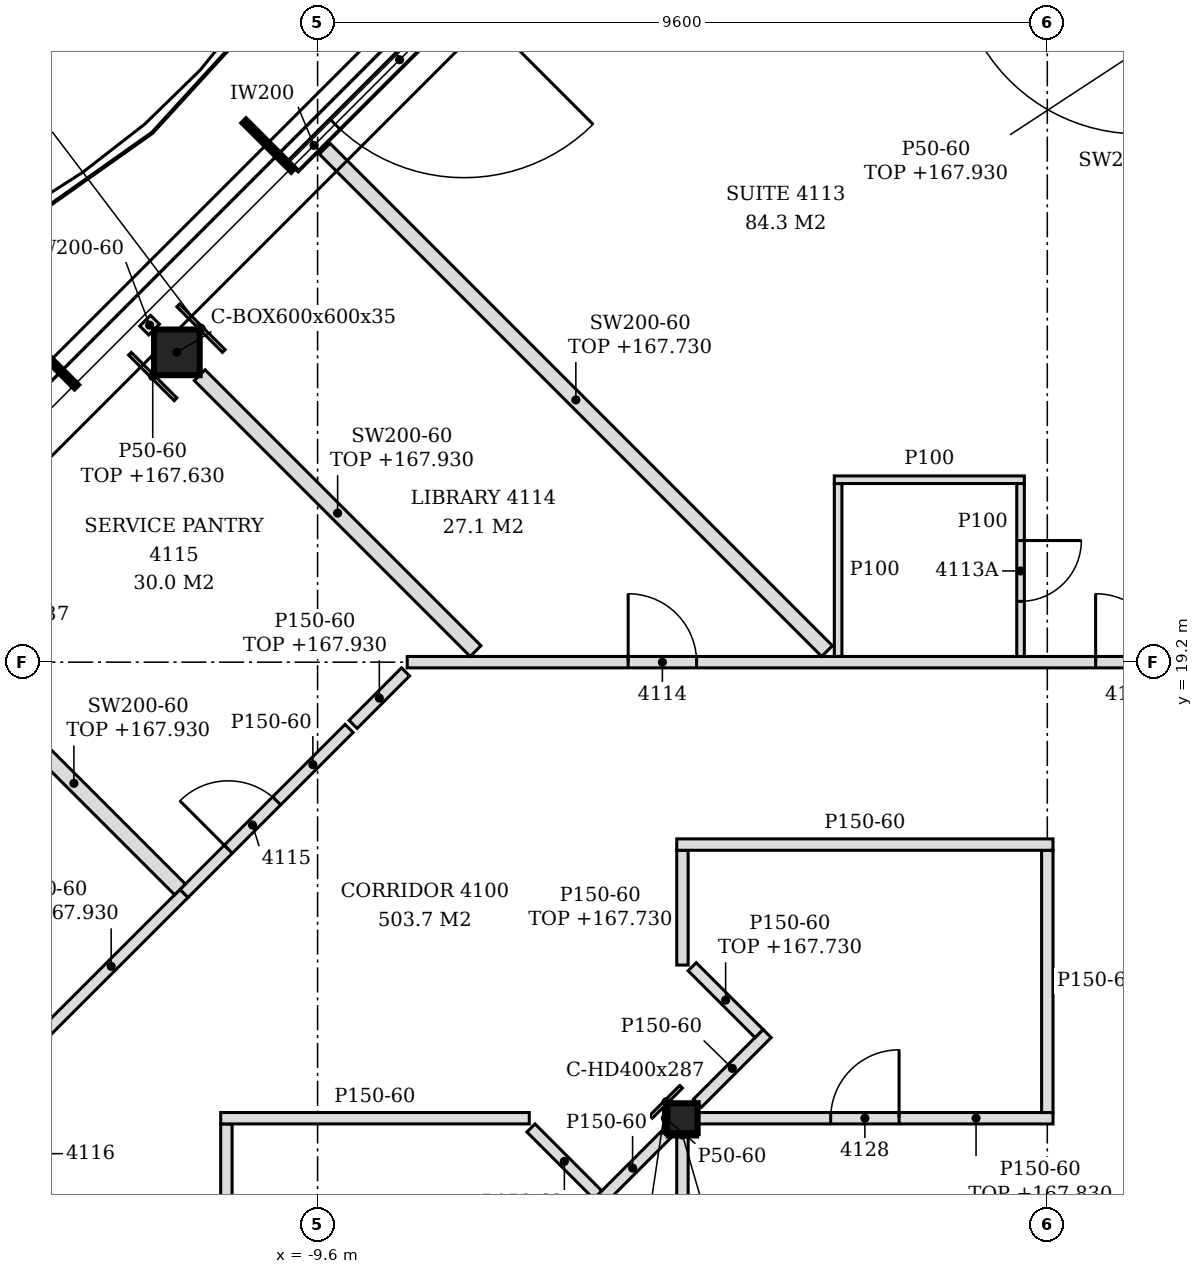
"""IFC4 building model, lengths in metres.
Left out: names, types, materials, properties, quantities, classifications, styles, units other than length and angle.
Written with IfcOpenShell. Run it as: python <this file> out.ifc"""

import sys

from ifc_helpers import new_model, si_unit, direction, frame, frame_2d, origin, origin_2d, place, context, subcontext, project, spatial, polyline, rectangle, hollow_rectangle, i_section, outline, extrude, element, fill, save


model = new_model("IFC4")
c1 = context("Model", 3, precision=1e-05, world=origin(), true_north=direction((0.0, 1.0)))
c2 = subcontext(c1, "Body", "Model", "MODEL_VIEW")
j1 = project(units=[si_unit("LENGTHUNIT", "METRE"), si_unit("PLANEANGLEUNIT", "RADIAN")], contexts=[c1])
p1 = place(None, origin())
s1 = spatial("IfcSite", under=j1, at=p1, CompositionType="ELEMENT")
p2 = place(p1, origin())
s2 = spatial("IfcBuilding", under=s1, at=p2, CompositionType="ELEMENT")
p3 = place(p2, frame((0.0, 0.0, 165.0)))
s3 = spatial("IfcBuildingStorey", under=s2, at=p3, CompositionType="ELEMENT", Elevation=165.0)
p4 = place(p3, frame((-11.451, 23.276, -0.15), z_axis=(0.0, 0.0, 1.0), x_axis=(1.0, 0.0, 0.0)))
e1 = element("IfcColumn", 1, at=p4, inside=s3, PredefinedType="COLUMN", context=c2, shape_type="SweptSolid", body=[
    extrude(hollow_rectangle(XDim=0.6, YDim=0.6, WallThickness=0.035, at=origin_2d()), origin(), (0.0, 0.0, 1.0), 3.6),
])
p5 = place(p3, frame((-4.8, 13.2, -0.15), z_axis=(0.0, 0.0, 1.0), x_axis=(1.0, 0.0, 0.0)))
e2 = element("IfcColumn", 2, at=p5, inside=s3, PredefinedType="COLUMN", context=c2, shape_type="SweptSolid", body=[
    extrude(i_section(OverallWidth=0.399, OverallDepth=0.393, WebThickness=0.023, FlangeThickness=0.037, FilletRadius=0.015, at=origin_2d()), origin(), (0.0, 0.0, 1.0), 3.6),
])
p6 = place(p3, frame((-7.125, 28.522, 0.0), z_axis=(0.0, 0.0, 1.0), x_axis=(-0.707106781187, -0.707106781187, 0.0)))
e3 = element("IfcWall", 3, at=p6, inside=s3, PredefinedType="NOTDEFINED", context=c2, shape_type="SweptSolid", body=[
    extrude(rectangle(XDim=3.962, YDim=0.2, at=frame_2d((1.981, 0.0))), origin(), (0.0, 0.0, 1.0), 3.45),
])
p7 = place(p6, frame((0.775, 0.0, 0.0)))
e4 = element("IfcOpeningElement", 4, at=p7, cuts=e3, PredefinedType="OPENING", context=c2, shape_type="SweptSolid", body=[
    extrude(rectangle(XDim=2.4, YDim=2.4, at=frame_2d((1.2, 1.2))), frame((0.0, 0.11, 0.0), z_axis=(0.0, -1.0, 0.0), x_axis=(1.0, 0.0, 0.0)), (0.0, 0.0, 1.0), 0.22),
])
p8 = place(p3, frame((-10.8, -2.506, 0.0), z_axis=(0.0, 0.0, 1.0), x_axis=(0.0, 1.0, 0.0)))
e5 = element("IfcWall", 5, at=p8, inside=s3, PredefinedType="PARTITIONING", context=c2, shape_type="SweptSolid", body=[
    extrude(outline(polyline([(0.0, 0.0), (15.631, 0.0), (15.631, 3.45), (12.206, 3.45), (12.204, 2.93), (12.006, 2.93), (12.004, 3.45), (7.406, 3.45), (7.404, 2.93), (7.206, 2.93), (7.204, 3.45), (2.606, 3.45), (2.604, 2.93), (2.406, 2.93), (2.404, 3.45), (0.0, 3.45), (0.0, 0.0)])), frame((0.0, 0.075, 0.0), z_axis=(0.0, -1.0, 0.0), x_axis=(1.0, 0.0, 0.0)), (0.0, 0.0, 1.0), 0.15),
])
p9 = place(p3, frame((-4.8, 2.596, 0.0), z_axis=(0.0, 0.0, 1.0), x_axis=(0.0, 1.0, 0.0)))
e6 = element("IfcWall", 6, at=p9, inside=s3, PredefinedType="PARTITIONING", context=c2, shape_type="SweptSolid", body=[
    extrude(rectangle(XDim=10.407, YDim=0.15, at=frame_2d((5.204, 0.0))), origin(), (0.0, 0.0, 1.0), 2.83),
])
p10 = place(p9, frame((0.553, 0.0, 0.0)))
e7 = element("IfcOpeningElement", 7, at=p10, cuts=e6, PredefinedType="OPENING", context=c2, shape_type="SweptSolid", body=[
    extrude(rectangle(XDim=0.9, YDim=2.1, at=frame_2d((0.45, 1.05))), frame((0.0, 0.085, 0.0), z_axis=(0.0, -1.0, 0.0), x_axis=(1.0, 0.0, 0.0)), (0.0, 0.0, 1.0), 0.17),
])
p11 = place(p3, frame((-5.914, 12.086, 0.0), z_axis=(0.0, 0.0, 1.0), x_axis=(0.707106781187, 0.707106781187, 0.0)))
e8 = element("IfcWall", 8, at=p11, inside=s3, PredefinedType="PARTITIONING", context=c2, shape_type="SweptSolid", body=[
    extrude(rectangle(XDim=1.295, YDim=0.15, at=frame_2d((0.648, 0.0))), origin(), (0.0, 0.0, 1.0), 3.45),
])
p12 = place(p3, frame((-5.914, 12.192, 0.0), z_axis=(0.0, 0.0, 1.0), x_axis=(-0.706812296552, 0.70740114323, 0.0)))
e9 = element("IfcWall", 9, at=p12, inside=s3, PredefinedType="PARTITIONING", context=c2, shape_type="SweptSolid", body=[
    extrude(rectangle(XDim=1.244, YDim=0.15, at=frame_2d((0.622, 0.0))), origin(), (0.0, 0.0, 1.0), 3.45),
])
p13 = place(p3, frame((-10.875, 13.2, 0.0), z_axis=(0.0, 0.0, 1.0), x_axis=(1.0, 0.0, 0.0)))
e10 = element("IfcWall", 10, at=p13, inside=s3, PredefinedType="PARTITIONING", context=c2, shape_type="SweptSolid", body=[
    extrude(rectangle(XDim=4.06, YDim=0.15, at=frame_2d((2.03, 0.0))), origin(), (0.0, 0.0, 1.0), 3.45),
])
p14 = place(p3, frame((-4.601, 13.2, 0.0), z_axis=(0.0, 0.0, 1.0), x_axis=(1.0, 0.0, 0.0)))
e11 = element("IfcWall", 11, at=p14, inside=s3, PredefinedType="PARTITIONING", context=c2, shape_type="SweptSolid", body=[
    extrude(rectangle(XDim=4.676, YDim=0.15, at=frame_2d((2.338, 0.0))), origin(), (0.0, 0.0, 1.0), 2.83),
])
p15 = place(p14, frame((1.75, 0.0, 0.0)))
e12 = element("IfcOpeningElement", 12, at=p15, cuts=e11, PredefinedType="OPENING", context=c2, shape_type="SweptSolid", body=[
    extrude(rectangle(XDim=0.9, YDim=2.1, at=frame_2d((0.45, 1.05))), frame((0.0, 0.085, 0.0), z_axis=(0.0, -1.0, 0.0), x_axis=(1.0, 0.0, 0.0)), (0.0, 0.0, 1.0), 0.17),
])
p16 = place(p3, frame((0.0, 13.275, 0.0), z_axis=(0.0, 0.0, 1.0), x_axis=(0.0, 1.0, 0.0)))
e13 = element("IfcWall", 13, at=p16, inside=s3, PredefinedType="PARTITIONING", context=c2, shape_type="SweptSolid", body=[
    extrude(outline(polyline([(0.0, 0.0), (3.45, 0.0), (3.45, 3.45), (0.075, 3.45), (0.073, 2.83), (0.0, 2.83), (0.0, 0.0)])), frame((0.0, 0.075, 0.0), z_axis=(0.0, -1.0, 0.0), x_axis=(1.0, 0.0, 0.0)), (0.0, 0.0, 1.0), 0.15),
])
p17 = place(p3, frame((-4.602, 13.398, 0.0), z_axis=(0.0, 0.0, 1.0), x_axis=(0.707106781187, 0.707106781187, 0.0)))
e14 = element("IfcWall", 14, at=p17, inside=s3, PredefinedType="PARTITIONING", context=c2, shape_type="SweptSolid", body=[
    extrude(rectangle(XDim=1.296, YDim=0.15, at=frame_2d((0.648, 0.0))), origin(), (0.0, 0.0, 1.0), 3.45),
])
p18 = place(p3, frame((-13.275, 14.24, 0.0), z_axis=(0.0, 0.0, 1.0), x_axis=(0.707286821097, 0.706926695424, 0.0)))
e15 = element("IfcWall", 15, at=p18, inside=s3, PredefinedType="PARTITIONING", context=c2, shape_type="SweptSolid", body=[
    extrude(rectangle(XDim=2.712, YDim=0.15, at=frame_2d((1.356, 0.0))), origin(), (0.0, 0.0, 1.0), 2.93),
])
p19 = place(p3, frame((-3.792, 14.314, 0.0), z_axis=(0.0, 0.0, 1.0), x_axis=(-0.707499182195, 0.706714162298, 0.0)))
e16 = element("IfcWall", 16, at=p19, inside=s3, PredefinedType="PARTITIONING", context=c2, shape_type="SweptSolid", body=[
    extrude(rectangle(XDim=1.244, YDim=0.15, at=frame_2d((0.622, 0.0))), origin(), (0.0, 0.0, 1.0), 2.73),
])
p20 = place(p3, frame((-4.8, 15.215, 0.0), z_axis=(0.0, 0.0, 1.0), x_axis=(0.0, 1.0, 0.0)))
e17 = element("IfcWall", 17, at=p20, inside=s3, PredefinedType="PARTITIONING", context=c2, shape_type="SweptSolid", body=[
    extrude(rectangle(XDim=1.51, YDim=0.15, at=frame_2d((0.755, 0.0))), origin(), (0.0, 0.0, 1.0), 2.73),
])
p21 = place(p3, frame((-11.357, 16.157, 0.0), z_axis=(0.0, 0.0, 1.0), x_axis=(0.707106781187, 0.707106781187, 0.0)))
e18 = element("IfcWall", 18, at=p21, inside=s3, PredefinedType="PARTITIONING", context=c2, shape_type="SweptSolid", body=[
    extrude(rectangle(XDim=3.071, YDim=0.15, at=frame_2d((1.535, 0.0))), origin(), (0.0, 0.0, 1.0), 3.45),
])
p22 = place(p21, frame((0.823, 0.0, 0.0)))
e19 = element("IfcOpeningElement", 19, at=p22, cuts=e18, PredefinedType="OPENING", context=c2, shape_type="SweptSolid", body=[
    extrude(rectangle(XDim=0.9, YDim=2.1, at=frame_2d((0.45, 1.05))), frame((0.0, 0.085, 0.0), z_axis=(0.0, -1.0, 0.0), x_axis=(1.0, 0.0, 0.0)), (0.0, 0.0, 1.0), 0.17),
])
p23 = place(p3, frame((-11.41, 16.21, 0.0), z_axis=(0.0, 0.0, 1.0), x_axis=(-0.707106781187, 0.707106781187, 0.0)))
e20 = element("IfcWall", 20, at=p23, inside=s3, PredefinedType="PARTITIONING", context=c2, shape_type="SweptSolid", body=[
    extrude(rectangle(XDim=3.948, YDim=0.2, at=frame_2d((1.974, 0.0))), origin(), (0.0, 0.0, 1.0), 2.93),
])
p24 = place(p3, frame((-4.875, 16.8, 0.0), z_axis=(0.0, 0.0, 1.0), x_axis=(1.0, 0.0, 0.0)))
e21 = element("IfcWall", 21, at=p24, inside=s3, PredefinedType="PARTITIONING", context=c2, shape_type="SweptSolid", body=[
    extrude(outline(polyline([(0.0, 0.0), (4.95, 0.0), (4.95, 3.45), (0.225, 3.45), (0.223, 2.73), (0.0, 2.73), (0.0, 0.0)])), frame((0.0, 0.075, 0.0), z_axis=(0.0, -1.0, 0.0), x_axis=(1.0, 0.0, 0.0)), (0.0, 0.0, 1.0), 0.15),
])
p25 = place(p3, frame((-9.133, 18.381, 0.0), z_axis=(0.0, 0.0, 1.0), x_axis=(0.706731558776, 0.707481804593, 0.0)))
e22 = element("IfcWall", 22, at=p25, inside=s3, PredefinedType="PARTITIONING", context=c2, shape_type="SweptSolid", body=[
    extrude(rectangle(XDim=0.976, YDim=0.15, at=frame_2d((0.488, 0.0))), origin(), (0.0, 0.0, 1.0), 2.93),
])
p26 = place(p3, frame((-8.421, 19.2, 0.0), z_axis=(0.0, 0.0, 1.0), x_axis=(1.0, 0.0, 0.0)))
e23 = element("IfcWall", 23, at=p26, inside=s3, PredefinedType="PARTITIONING", context=c2, shape_type="SweptSolid", body=[
    extrude(outline(polyline([(0.0, 0.0), (31.242, 0.0), (31.242, 2.88), (27.771, 2.88), (27.769, 2.73), (27.471, 2.73), (27.469, 2.88), (15.771, 2.88), (15.769, 2.73), (15.471, 2.73), (15.469, 2.88), (3.771, 2.88), (3.769, 2.73), (3.471, 2.73), (3.469, 2.88), (0.0, 2.88), (0.0, 0.0)])), frame((0.0, 0.075, 0.0), z_axis=(0.0, -1.0, 0.0), x_axis=(1.0, 0.0, 0.0)), (0.0, 0.0, 1.0), 0.15),
])
p27 = place(p26, frame((25.997, 0.0, 0.0)))
e24 = element("IfcOpeningElement", 24, at=p27, cuts=e23, PredefinedType="OPENING", context=c2, shape_type="SweptSolid", body=[
    extrude(rectangle(XDim=0.9, YDim=2.1, at=frame_2d((0.45, 1.05))), frame((0.0, 0.085, 0.0), z_axis=(0.0, -1.0, 0.0), x_axis=(1.0, 0.0, 0.0)), (0.0, 0.0, 1.0), 0.17),
])
p28 = place(p26, frame((17.93, 0.0, 0.0)))
e25 = element("IfcOpeningElement", 25, at=p28, cuts=e23, PredefinedType="OPENING", context=c2, shape_type="SweptSolid", body=[
    extrude(rectangle(XDim=0.9, YDim=2.1, at=frame_2d((0.45, 1.05))), frame((0.0, 0.085, 0.0), z_axis=(0.0, -1.0, 0.0), x_axis=(1.0, 0.0, 0.0)), (0.0, 0.0, 1.0), 0.17),
])
p29 = place(p26, frame((14.754, 0.0, 0.0)))
e26 = element("IfcOpeningElement", 26, at=p29, cuts=e23, PredefinedType="OPENING", context=c2, shape_type="SweptSolid", body=[
    extrude(rectangle(XDim=0.9, YDim=2.1, at=frame_2d((0.45, 1.05))), frame((0.0, 0.085, 0.0), z_axis=(0.0, -1.0, 0.0), x_axis=(1.0, 0.0, 0.0)), (0.0, 0.0, 1.0), 0.17),
])
p30 = place(p26, frame((9.057, 0.0, 0.0)))
e27 = element("IfcOpeningElement", 27, at=p30, cuts=e23, PredefinedType="OPENING", context=c2, shape_type="SweptSolid", body=[
    extrude(rectangle(XDim=0.9, YDim=2.1, at=frame_2d((0.45, 1.05))), frame((0.0, 0.085, 0.0), z_axis=(0.0, -1.0, 0.0), x_axis=(1.0, 0.0, 0.0)), (0.0, 0.0, 1.0), 0.17),
])
p31 = place(p26, frame((2.907, 0.0, 0.0)))
e28 = element("IfcOpeningElement", 28, at=p31, cuts=e23, PredefinedType="OPENING", context=c2, shape_type="SweptSolid", body=[
    extrude(rectangle(XDim=0.9, YDim=2.1, at=frame_2d((0.45, 1.05))), frame((0.0, 0.085, 0.0), z_axis=(0.0, -1.0, 0.0), x_axis=(1.0, 0.0, 0.0)), (0.0, 0.0, 1.0), 0.17),
])
p32 = place(p3, frame((-7.522, 19.346, 0.0), z_axis=(0.0, 0.0, 1.0), x_axis=(-0.707106781187, 0.707106781187, 0.0)))
e29 = element("IfcWall", 29, at=p32, inside=s3, PredefinedType="PARTITIONING", context=c2, shape_type="SweptSolid", body=[
    extrude(rectangle(XDim=5.134, YDim=0.2, at=frame_2d((2.567, 0.0))), origin(), (0.0, 0.0, 1.0), 2.93),
])
p33 = place(p3, frame((-2.898, 19.346, 0.0), z_axis=(0.0, 0.0, 1.0), x_axis=(-0.707106781187, 0.707106781187, 0.0)))
e30 = element("IfcWall", 30, at=p33, inside=s3, PredefinedType="PARTITIONING", context=c2, shape_type="SweptSolid", body=[
    extrude(rectangle(XDim=9.347, YDim=0.2, at=frame_2d((4.674, 0.0))), origin(), (0.0, 0.0, 1.0), 2.73),
])
p34 = place(p3, frame((-2.752, 19.275, 0.0), z_axis=(0.0, 0.0, 1.0), x_axis=(0.0, 1.0, 0.0)))
e31 = element("IfcWall", 31, at=p34, inside=s3, PredefinedType="PARTITIONING", context=c2, shape_type="SweptSolid", body=[
    extrude(outline(polyline([(0.0, 0.0), (2.275, 0.0), (2.275, 3.45), (0.03, 3.45), (0.028, 2.88), (0.0, 2.88), (0.0, 0.0)])), frame((0.0, 0.05, 0.0), z_axis=(0.0, -1.0, 0.0), x_axis=(1.0, 0.0, 0.0)), (0.0, 0.0, 1.0), 0.1),
])
p35 = place(p3, frame((-0.352, 19.275, 0.0), z_axis=(0.0, 0.0, 1.0), x_axis=(0.0, 1.0, 0.0)))
e32 = element("IfcWall", 32, at=p35, inside=s3, PredefinedType="PARTITIONING", context=c2, shape_type="SweptSolid", body=[
    extrude(outline(polyline([(0.0, 0.0), (2.275, 0.0), (2.275, 3.45), (0.03, 3.45), (0.028, 2.88), (0.0, 2.88), (0.0, 0.0)])), frame((0.0, 0.05, 0.0), z_axis=(0.0, -1.0, 0.0), x_axis=(1.0, 0.0, 0.0)), (0.0, 0.0, 1.0), 0.1),
])
p36 = place(p35, frame((0.725, 0.0, 0.0)))
e33 = element("IfcOpeningElement", 33, at=p36, cuts=e32, PredefinedType="OPENING", context=c2, shape_type="SweptSolid", body=[
    extrude(rectangle(XDim=0.8, YDim=2.1, at=frame_2d((0.4, 1.05))), frame((0.0, 0.06, 0.0), z_axis=(0.0, -1.0, 0.0), x_axis=(1.0, 0.0, 0.0)), (0.0, 0.0, 1.0), 0.12),
])
p37 = place(p3, frame((-2.802, 21.6, 0.0), z_axis=(0.0, 0.0, 1.0), x_axis=(1.0, 0.0, 0.0)))
e34 = element("IfcWall", 34, at=p37, inside=s3, PredefinedType="PARTITIONING", context=c2, shape_type="SweptSolid", body=[
    extrude(rectangle(XDim=2.5, YDim=0.1, at=frame_2d((1.25, 0.0))), origin(), (0.0, 0.0, 1.0), 3.45),
])
p38 = place(p3, frame((-11.752, 23.576, 0.0), z_axis=(0.0, 0.0, 1.0), x_axis=(-0.707106781187, 0.707106781187, 0.0)))
e35 = element("IfcWall", 35, at=p38, inside=s3, PredefinedType="PARTITIONING", context=c2, shape_type="SweptSolid", body=[
    extrude(rectangle(XDim=0.166, YDim=0.2, at=frame_2d((0.083, 0.0))), origin(), (0.0, 0.0, 1.0), 3.45),
])
p39 = place(p3, frame((-5.024, 13.003, 0.0), z_axis=(0.0, 0.0, 1.0), x_axis=(0.0, 1.0, 0.0)))
e36 = element("IfcWall", 36, at=p39, inside=s3, PredefinedType="PARTITIONING", context=c2, shape_type="SweptSolid", body=[
    extrude(rectangle(XDim=0.393, YDim=0.05, at=frame_2d((0.197, 0.0))), origin(), (0.0, 0.0, 1.0), 3.45),
])
p40 = place(p3, frame((-5.214, 13.218, 0.0), z_axis=(0.0, 0.0, 1.0), x_axis=(0.707106781187, 0.707106781187, 0.0)))
e37 = element("IfcWall", 37, at=p40, inside=s3, PredefinedType="PARTITIONING", context=c2, shape_type="SweptSolid", body=[
    extrude(rectangle(XDim=0.56, YDim=0.05, at=frame_2d((0.28, 0.0))), origin(), (0.0, 0.0, 1.0), 2.73),
])
p41 = place(p3, frame((-5.0, 12.979, 0.0), z_axis=(0.0, 0.0, 1.0), x_axis=(1.0, 0.0, 0.0)))
e38 = element("IfcWall", 38, at=p41, inside=s3, PredefinedType="PARTITIONING", context=c2, shape_type="SweptSolid", body=[
    extrude(rectangle(XDim=0.399, YDim=0.05, at=frame_2d((0.199, 0.0))), origin(), (0.0, 0.0, 1.0), 2.83),
])
p42 = place(p3, frame((-11.469, 22.658, 0.0), z_axis=(0.0, 0.0, 1.0), x_axis=(-0.706962899457, 0.707250633645, 0.0)))
e39 = element("IfcWall", 39, at=p42, inside=s3, PredefinedType="PARTITIONING", context=c2, shape_type="SweptSolid", body=[
    extrude(rectangle(XDim=0.848, YDim=0.05, at=frame_2d((0.424, 0.0))), origin(), (0.0, 0.0, 1.0), 2.63),
])
p43 = place(p3, frame((-10.834, 23.293, 0.0), z_axis=(0.0, 0.0, 1.0), x_axis=(-0.707250633645, 0.706962899457, 0.0)))
e40 = element("IfcWall", 40, at=p43, inside=s3, PredefinedType="PARTITIONING", context=c2, shape_type="SweptSolid", body=[
    extrude(rectangle(XDim=0.848, YDim=0.05, at=frame_2d((0.424, 0.0))), origin(), (0.0, 0.0, 1.0), 2.93),
])
p44 = place(p7, origin())
e41 = element("IfcDoor", 41, at=p44, inside=s3, OperationType="SINGLE_SWING_LEFT", PredefinedType="DOOR", context=c2, shape_type="SweptSolid", body=[
    extrude(rectangle(XDim=2.4, YDim=2.4, at=frame_2d((1.2, 1.2))), frame((0.0, 0.025, 0.0), z_axis=(0.0, -1.0, 0.0), x_axis=(1.0, 0.0, 0.0)), (0.0, 0.0, 1.0), 0.05),
])
fill(e4, e41)
p45 = place(p30, origin())
e42 = element("IfcDoor", 42, at=p45, inside=s3, OperationType="SINGLE_SWING_LEFT", PredefinedType="DOOR", context=c2, shape_type="SweptSolid", body=[
    extrude(rectangle(XDim=0.9, YDim=2.1, at=frame_2d((0.45, 1.05))), frame((0.0, 0.025, 0.0), z_axis=(0.0, -1.0, 0.0), x_axis=(1.0, 0.0, 0.0)), (0.0, 0.0, 1.0), 0.05),
])
fill(e27, e42)
p46 = place(p36, frame((0.8, 0.0, 0.0), z_axis=(0.0, 0.0, 1.0), x_axis=(-1.0, 0.0, 0.0)))
e43 = element("IfcDoor", 43, at=p46, inside=s3, OperationType="SINGLE_SWING_LEFT", PredefinedType="DOOR", context=c2, shape_type="SweptSolid", body=[
    extrude(rectangle(XDim=0.8, YDim=2.1, at=frame_2d((0.4, 1.05))), frame((0.0, 0.025, 0.0), z_axis=(0.0, -1.0, 0.0), x_axis=(1.0, 0.0, 0.0)), (0.0, 0.0, 1.0), 0.05),
])
fill(e33, e43)
p47 = place(p31, origin())
e44 = element("IfcDoor", 44, at=p47, inside=s3, OperationType="SINGLE_SWING_LEFT", PredefinedType="DOOR", context=c2, shape_type="SweptSolid", body=[
    extrude(rectangle(XDim=0.9, YDim=2.1, at=frame_2d((0.45, 1.05))), frame((0.0, 0.025, 0.0), z_axis=(0.0, -1.0, 0.0), x_axis=(1.0, 0.0, 0.0)), (0.0, 0.0, 1.0), 0.05),
])
fill(e28, e44)
p48 = place(p22, origin())
e45 = element("IfcDoor", 45, at=p48, inside=s3, OperationType="SINGLE_SWING_LEFT", PredefinedType="DOOR", context=c2, shape_type="SweptSolid", body=[
    extrude(rectangle(XDim=0.9, YDim=2.1, at=frame_2d((0.45, 1.05))), frame((0.0, 0.025, 0.0), z_axis=(0.0, -1.0, 0.0), x_axis=(1.0, 0.0, 0.0)), (0.0, 0.0, 1.0), 0.05),
])
fill(e19, e45)
p49 = place(p15, origin())
e46 = element("IfcDoor", 46, at=p49, inside=s3, OperationType="SINGLE_SWING_RIGHT", PredefinedType="DOOR", context=c2, shape_type="SweptSolid", body=[
    extrude(rectangle(XDim=0.9, YDim=2.1, at=frame_2d((0.45, 1.05))), frame((0.0, 0.025, 0.0), z_axis=(0.0, -1.0, 0.0), x_axis=(1.0, 0.0, 0.0)), (0.0, 0.0, 1.0), 0.05),
])
fill(e12, e46)
save(model, sys.argv[1])
